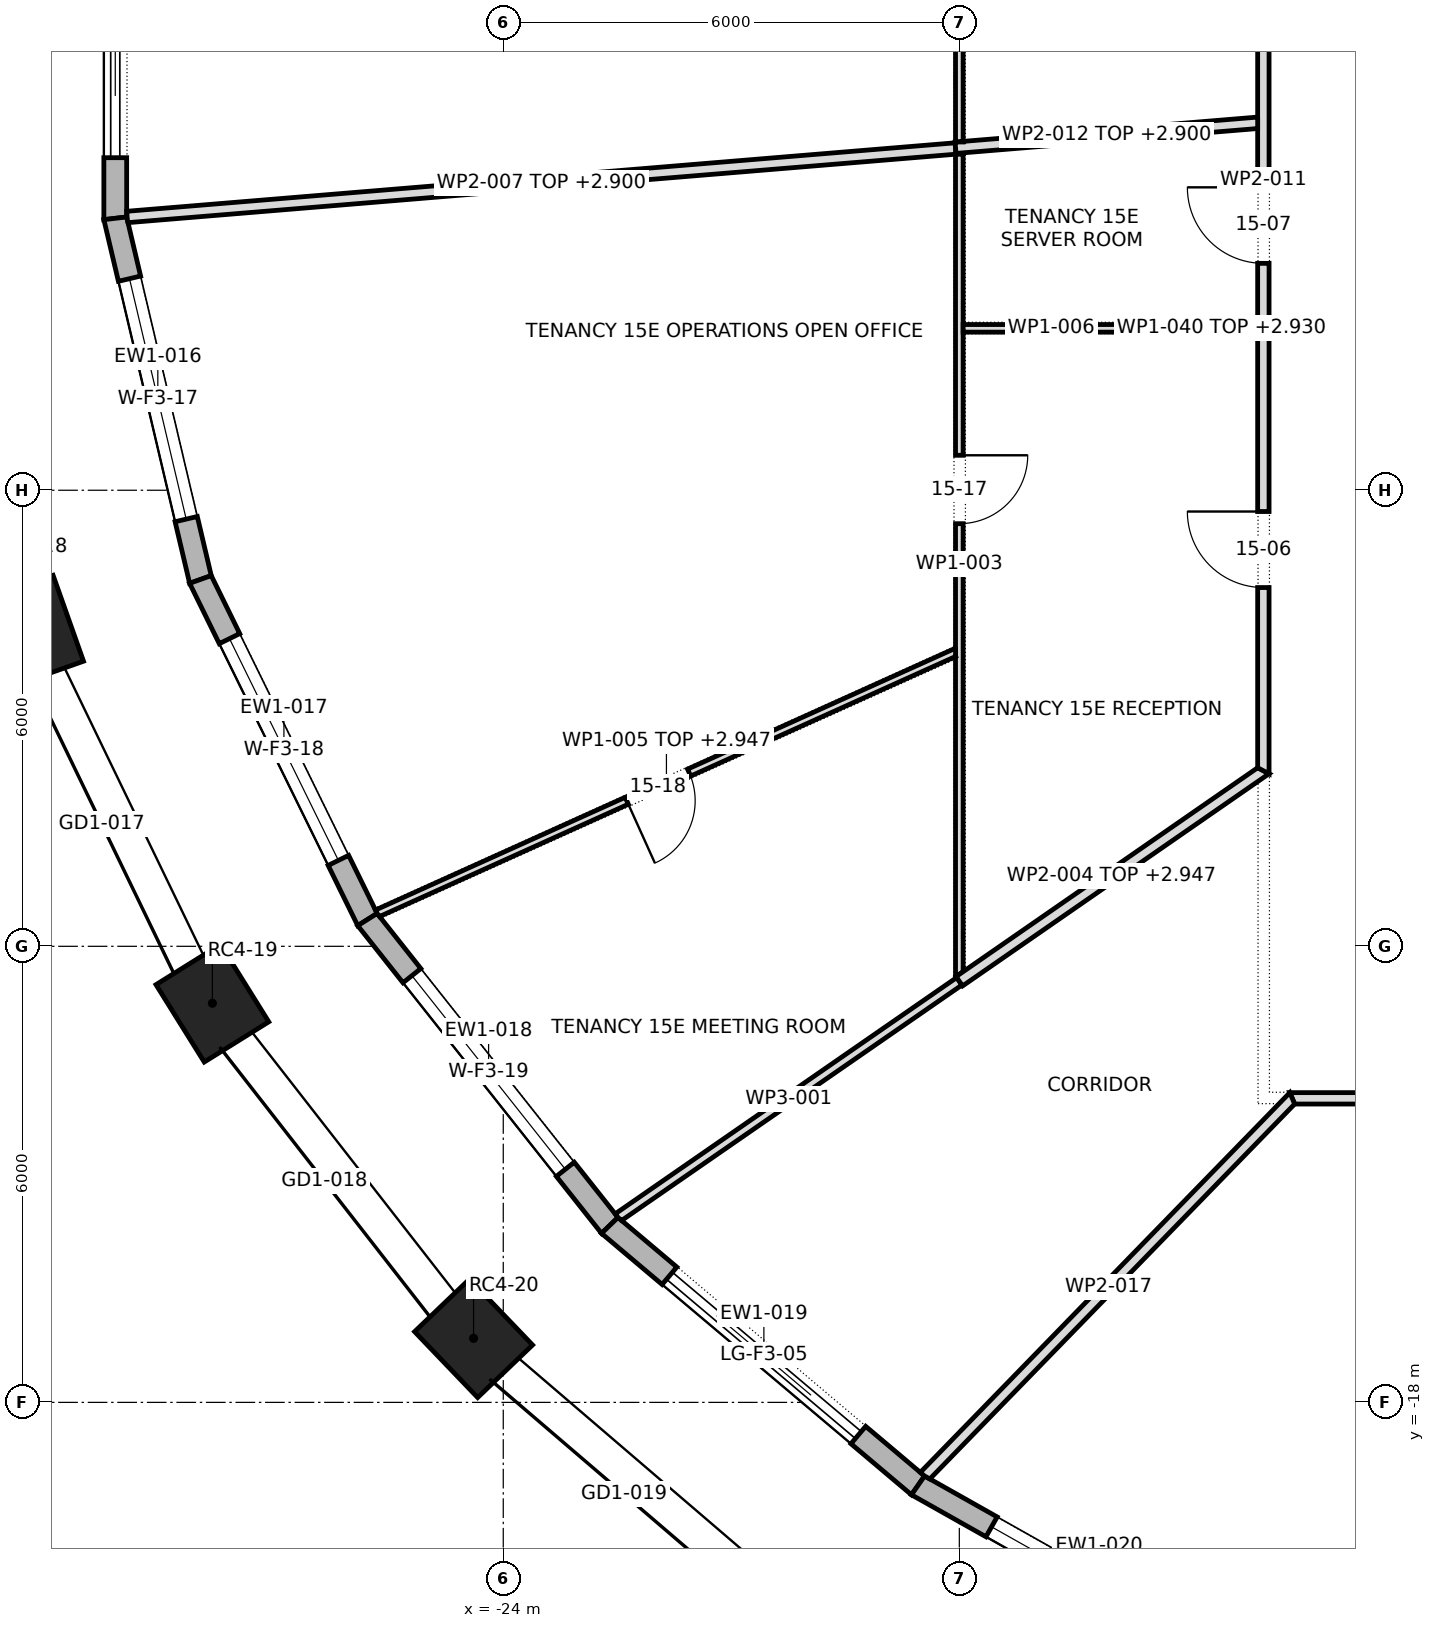
"""IFC4 building model, lengths in metres.
Left out: names, types, materials, properties, quantities, classifications, styles, units other than length and angle.
Written with IfcOpenShell. Run it as: python <this file> out.ifc"""

import sys

from ifc_helpers import new_model, si_unit, direction, frame, frame_2d, origin, origin_2d, place, context, subcontext, project, spatial, polyline, rectangle, outline, extrude, element, fill, save


model = new_model("IFC4")
c1 = context("Model", 3, precision=1e-05, world=origin(), true_north=direction((0.0, 1.0)))
c2 = subcontext(c1, "Body", "Model", "MODEL_VIEW")
j1 = project(units=[si_unit("LENGTHUNIT", "METRE"), si_unit("PLANEANGLEUNIT", "RADIAN")], contexts=[c1])
p1 = place(None, origin())
s1 = spatial("IfcSite", under=j1, at=p1, CompositionType="ELEMENT")
p2 = place(p1, origin())
s2 = spatial("IfcBuilding", under=s1, at=p2, CompositionType="ELEMENT")
p3 = place(p2, frame((0.0, 0.0, 222.9)))
s3 = spatial("IfcBuildingStorey", under=s2, at=p3, CompositionType="ELEMENT", Elevation=222.9)
for number, where, z_axis, x_axis in (
    (1, (-30.194, -7.851, 0.0), (0.0, 0.0, 1.0), (0.334, -0.943, 0.0)),
    (2, (-27.827, -12.749, 0.0), (0.0, 0.0, 1.0), (0.529, -0.849, 0.0)),
    (3, (-24.39, -17.157, 0.0), (0.0, 0.0, 1.0), (0.692, -0.722, 0.0)),
):
    element("IfcColumn", number, at=place(p3, frame(where, z_axis=z_axis, x_axis=x_axis)), inside=s3, PredefinedType="COLUMN", context=c2, shape_type="SweptSolid", body=[
        extrude(rectangle(XDim=1.2, YDim=1.0, at=origin_2d()), origin(), (0.0, 0.0, 1.0), 4.0),
    ])
p4 = place(p3, frame((-29.104, 2.423, 0.0), z_axis=(0.0, 0.0, 1.0), x_axis=(0.0, -1.0, 0.0)))
e4 = element("IfcWall", 4, at=p4, inside=s3, PredefinedType="STANDARD", context=c2, shape_type="SweptSolid", body=[
    extrude(outline(polyline([(-0.017, -0.15), (4.863, -0.15), (4.828, 0.15), (0.017, 0.15), (-0.017, -0.15)])), origin(), (0.0, 0.0, 1.0), 3.7),
])
p5 = place(p4, frame((0.798, 0.0, 0.0)))
e5 = element("IfcOpeningElement", 5, at=p5, cuts=e4, PredefinedType="OPENING", context=c2, shape_type="SweptSolid", body=[
    extrude(rectangle(XDim=3.25, YDim=3.25, at=frame_2d((1.625, 1.625))), frame((0.0, 0.162, 0.0), z_axis=(0.0, -1.0, 0.0), x_axis=(1.0, 0.0, 0.0)), (0.0, 0.0, 1.0), 0.324),
])
p6 = place(p3, frame((-29.104, -2.423, 0.0), z_axis=(0.0, 0.0, 1.0), x_axis=(0.229546618766, -0.97329766763, 0.0)))
e6 = element("IfcWall", 6, at=p6, inside=s3, PredefinedType="STANDARD", context=c2, shape_type="SweptSolid", body=[
    extrude(outline(polyline([(-0.017, -0.15), (4.899, -0.15), (4.865, 0.15), (0.017, 0.15), (-0.017, -0.15)])), origin(), (0.0, 0.0, 1.0), 3.7),
])
p7 = place(p6, frame((0.816, 0.0, 0.6)))
e7 = element("IfcOpeningElement", 7, at=p7, cuts=e6, PredefinedType="OPENING", context=c2, shape_type="SweptSolid", body=[
    extrude(rectangle(XDim=3.25, YDim=2.65, at=frame_2d((1.625, 1.325))), frame((0.0, 0.162, 0.0), z_axis=(0.0, -1.0, 0.0), x_axis=(1.0, 0.0, 0.0)), (0.0, 0.0, 1.0), 0.324),
])
p8 = place(p3, frame((-27.984, -7.174, 0.0), z_axis=(0.0, 0.0, 1.0), x_axis=(0.440795186599, -0.897607711348, 0.0)))
e8 = element("IfcWall", 8, at=p8, inside=s3, PredefinedType="STANDARD", context=c2, shape_type="SweptSolid", body=[
    extrude(outline(polyline([(-0.017, -0.15), (5.0, -0.15), (4.968, 0.15), (0.017, 0.15), (-0.017, -0.15)])), origin(), (0.0, 0.0, 1.0), 3.7),
])
p9 = place(p8, frame((0.867, 0.0, 0.6)))
e9 = element("IfcOpeningElement", 9, at=p9, cuts=e8, PredefinedType="OPENING", context=c2, shape_type="SweptSolid", body=[
    extrude(rectangle(XDim=3.25, YDim=2.65, at=frame_2d((1.625, 1.325))), frame((0.0, 0.162, 0.0), z_axis=(0.0, -1.0, 0.0), x_axis=(1.0, 0.0, 0.0)), (0.0, 0.0, 1.0), 0.324),
])
p10 = place(p3, frame((-25.787, -11.648, 0.0), z_axis=(0.0, 0.0, 1.0), x_axis=(0.621017151557, -0.783796974651, 0.0)))
e10 = element("IfcWall", 10, at=p10, inside=s3, PredefinedType="STANDARD", context=c2, shape_type="SweptSolid", body=[
    extrude(outline(polyline([(-0.016, -0.15), (5.149, -0.15), (5.119, 0.15), (0.016, 0.15), (-0.016, -0.15)])), origin(), (0.0, 0.0, 1.0), 3.7),
])
p11 = place(p10, frame((0.942, 0.0, 0.6)))
e11 = element("IfcOpeningElement", 11, at=p11, cuts=e10, PredefinedType="OPENING", context=c2, shape_type="SweptSolid", body=[
    extrude(rectangle(XDim=3.25, YDim=2.65, at=frame_2d((1.625, 1.325))), frame((0.0, 0.162, 0.0), z_axis=(0.0, -1.0, 0.0), x_axis=(1.0, 0.0, 0.0)), (0.0, 0.0, 1.0), 0.324),
])
p12 = place(p3, frame((-22.599, -15.672, 0.0), z_axis=(0.0, 0.0, 1.0), x_axis=(0.764397795062, -0.644744919255, 0.0)))
e12 = element("IfcWall", 12, at=p12, inside=s3, PredefinedType="STANDARD", context=c2, shape_type="SweptSolid", body=[
    extrude(outline(polyline([(-0.015, -0.15), (5.319, -0.15), (5.291, 0.15), (0.015, 0.15), (-0.015, -0.15)])), origin(), (0.0, 0.0, 1.0), 3.7),
])
p13 = place(p12, frame((1.028, 0.0, 0.0)))
e13 = element("IfcOpeningElement", 13, at=p13, cuts=e12, PredefinedType="OPENING", context=c2, shape_type="SweptSolid", body=[
    extrude(rectangle(XDim=3.25, YDim=3.25, at=frame_2d((1.625, 1.625))), frame((0.0, 0.162, 0.0), z_axis=(0.0, -1.0, 0.0), x_axis=(1.0, 0.0, 0.0)), (0.0, 0.0, 1.0), 0.324),
])
p14 = place(p3, frame((-18.543, -19.092, 0.0), z_axis=(0.0, 0.0, 1.0), x_axis=(0.871207038577, -0.490915772749, 0.0)))
e14 = element("IfcWall", 14, at=p14, inside=s3, PredefinedType="STANDARD", context=c2, shape_type="SweptSolid", body=[
    extrude(outline(polyline([(-0.014, -0.15), (5.484, -0.15), (5.458, 0.15), (0.014, 0.15), (-0.014, -0.15)])), origin(), (0.0, 0.0, 1.0), 3.7),
])
p15 = place(p14, frame((1.111, 0.0, 0.6)))
e15 = element("IfcOpeningElement", 15, at=p15, cuts=e14, PredefinedType="OPENING", context=c2, shape_type="SweptSolid", body=[
    extrude(rectangle(XDim=3.25, YDim=2.65, at=frame_2d((1.625, 1.325))), frame((0.0, 0.162, 0.0), z_axis=(0.0, -1.0, 0.0), x_axis=(1.0, 0.0, 0.0)), (0.0, 0.0, 1.0), 0.324),
])
p16 = place(p3, frame((-22.493, -15.569, 0.0), z_axis=(0.0, 0.0, 1.0), x_axis=(0.822322462014, 0.569021764494, 0.0)))
e16 = element("IfcWall", 16, at=p16, inside=s3, PredefinedType="PARTITIONING", context=c2, shape_type="SweptSolid", body=[
    extrude(outline(polyline([(0.02, -0.06), (1.834, -0.06), (3.649, -0.06), (5.464, -0.06), (5.464, 0.06), (3.643, 0.06), (1.821, 0.06), (0.0, 0.06), (0.0, 0.053), (0.003, 0.0), (0.02, -0.06)])), origin(), (0.0, 0.0, 1.0), 3.7),
])
p17 = place(p3, frame((-18.0, -12.421, 0.0), z_axis=(0.0, 0.0, 1.0), x_axis=(0.0, 1.0, 0.0)))
e17 = element("IfcWall", 17, at=p17, inside=s3, PredefinedType="PARTITIONING", context=c2, shape_type="SweptSolid", body=[
    extrude(outline(polyline([(0.087, -0.05), (1.77, -0.05), (3.453, -0.05), (5.136, -0.05), (6.819, -0.05), (8.501, -0.05), (8.501, -0.05), (8.601, -0.05), (8.601, -0.05), (10.842, -0.05), (10.842, 0.046), (10.842, 0.05), (9.191, 0.05), (7.541, 0.05), (5.89, 0.05), (4.24, 0.05), (4.235, 0.048), (4.234, 0.05), (2.823, 0.05), (1.411, 0.05), (0.0, 0.05), (0.0, 0.05), (0.011, 0.034), (0.023, 0.043), (0.087, -0.05)])), origin(), (0.0, 0.0, 1.0), 3.7),
])
p18 = place(p17, frame((5.981, 0.0, 0.0)))
e18 = element("IfcOpeningElement", 18, at=p18, cuts=e17, PredefinedType="OPENING", context=c2, shape_type="SweptSolid", body=[
    extrude(rectangle(XDim=0.9, YDim=2.1, at=frame_2d((0.45, 1.05))), frame((0.0, 0.062, 0.0), z_axis=(0.0, -1.0, 0.0), x_axis=(1.0, 0.0, 0.0)), (0.0, 0.0, 1.0), 0.124),
])
p19 = place(p3, frame((-18.0, -12.46, 0.0), z_axis=(0.0, 0.0, 1.0), x_axis=(0.822102584422, 0.56933938972, 0.0)))
e19 = element("IfcWall", 19, at=p19, inside=s3, PredefinedType="PARTITIONING", context=c2, shape_type="SweptSolid", body=[
    extrude(outline(polyline([(0.0, -0.075), (1.635, -0.075), (3.27, -0.075), (4.905, -0.075), (4.826, 0.075), (3.217, 0.075), (1.609, 0.075), (0.0, 0.075), (0.0, -0.075)])), origin(), (0.0, 0.0, 1.0), 2.947),
])
p20 = place(p3, frame((-18.03, -8.123, 0.0), z_axis=(0.0, 0.0, 1.0), x_axis=(-0.911431984772, -0.411450771216, 0.0)))
e20 = element("IfcWall", 20, at=p20, inside=s3, PredefinedType="PARTITIONING", context=c2, shape_type="SweptSolid", body=[
    extrude(outline(polyline([(8.372, -0.05), (8.372, -0.042), (8.371, -0.0), (8.358, 0.05), (6.696, 0.05), (5.033, 0.05), (3.37, 0.05), (1.708, 0.05), (0.045, 0.05), (0.0, -0.05), (0.0, -0.05), (1.675, -0.05), (3.349, -0.05), (5.023, -0.05), (6.698, -0.05), (8.372, -0.05)])), origin(), (0.0, 0.0, 1.0), 2.947),
])
p21 = place(p20, frame((3.868, 0.0, 0.0)))
e21 = element("IfcOpeningElement", 21, at=p21, cuts=e20, PredefinedType="OPENING", context=c2, shape_type="SweptSolid", body=[
    extrude(rectangle(XDim=0.9, YDim=2.1, at=frame_2d((0.45, 1.05))), frame((0.0, 0.062, 0.0), z_axis=(0.0, -1.0, 0.0), x_axis=(1.0, 0.0, 0.0)), (0.0, 0.0, 1.0), 0.124),
])
p22 = place(p3, frame((-17.95, -3.87, 0.0), z_axis=(0.0, 0.0, 1.0), x_axis=(1.0, 0.0, 0.0)))
e22 = element("IfcWall", 22, at=p22, inside=s3, PredefinedType="PARTITIONING", context=c2, shape_type="SweptSolid", body=[
    extrude(rectangle(XDim=2.321, YDim=0.1, at=frame_2d((1.161, 0.0))), origin(), (0.0, 0.0, 1.0), 3.7),
])
p23 = place(p3, frame((-18.049, -1.504, 0.0), z_axis=(0.0, 0.0, 1.0), x_axis=(-0.996601116086, -0.082378488796, 0.0)))
e23 = element("IfcWall", 23, at=p23, inside=s3, PredefinedType="PARTITIONING", context=c2, shape_type="SweptSolid", body=[
    extrude(outline(polyline([(10.936, -0.075), (10.936, 0.044), (10.931, 0.075), (9.11, 0.075), (7.29, 0.075), (5.469, 0.075), (3.648, 0.075), (1.828, 0.075), (0.007, 0.075), (0.007, 0.074), (0.002, 0.075), (0.0, 0.075), (0.0, -0.075), (1.823, -0.075), (3.645, -0.075), (5.468, -0.075), (7.291, -0.075), (9.113, -0.075), (10.936, -0.075)])), origin(), (0.0, 0.0, 1.0), 2.9),
])
p24 = place(p3, frame((-18.0, -1.418, 0.0), z_axis=(0.0, 0.0, 1.0), x_axis=(0.0, 1.0, 0.0)))
e24 = element("IfcWall", 24, at=p24, inside=s3, PredefinedType="PARTITIONING", context=c2, shape_type="SweptSolid", body=[
    extrude(outline(polyline([(0.008, -0.05), (1.813, -0.05), (3.618, -0.05), (5.423, -0.05), (7.229, -0.05), (7.229, -0.05), (7.328, -0.05), (7.328, -0.05), (8.934, -0.05), (10.54, -0.05), (12.146, -0.05), (13.751, -0.05), (13.821, 0.05), (13.821, 0.05), (11.889, 0.05), (9.957, 0.05), (8.025, 0.05), (6.093, 0.05), (6.092, 0.048), (6.085, 0.05), (4.564, 0.05), (3.042, 0.05), (1.521, 0.05), (0.0, 0.05), (0.0, 0.045), (0.008, -0.05)])), origin(), (0.0, 0.0, 1.0), 3.7),
])
p25 = place(p24, frame((10.128, 0.0, 0.0)))
e25 = element("IfcOpeningElement", 25, at=p25, cuts=e24, PredefinedType="OPENING", context=c2, shape_type="SweptSolid", body=[
    extrude(rectangle(XDim=0.9, YDim=2.1, at=frame_2d((0.45, 1.05))), frame((0.0, 0.062, 0.0), z_axis=(0.0, -1.0, 0.0), x_axis=(1.0, 0.0, 0.0)), (0.0, 0.0, 1.0), 0.124),
])
p26 = place(p3, frame((-13.652, -14.0, 0.0), z_axis=(0.0, 0.0, 1.0), x_axis=(1.0, 0.0, 0.0)))
e26 = element("IfcWall", 26, at=p26, inside=s3, PredefinedType="PARTITIONING", context=c2, shape_type="SweptSolid", body=[
    extrude(outline(polyline([(0.063, -0.075), (2.004, -0.075), (3.946, -0.075), (5.887, -0.075), (7.828, -0.075), (9.769, -0.075), (11.71, -0.075), (13.652, -0.075), (15.593, -0.075), (17.534, -0.075), (19.475, -0.075), (21.417, -0.075), (23.358, -0.075), (25.299, -0.075), (27.24, -0.075), (27.303, 0.075), (27.303, 0.075), (25.353, 0.075), (23.403, 0.075), (21.453, 0.075), (19.502, 0.075), (17.552, 0.075), (15.602, 0.075), (13.652, 0.075), (11.701, 0.075), (9.751, 0.075), (7.801, 0.075), (5.851, 0.075), (3.9, 0.075), (1.95, 0.075), (0.0, 0.075), (0.0, 0.075), (0.063, -0.075)])), origin(), (0.0, 0.0, 1.0), 3.7),
])
p27 = place(p26, frame((5.527, 0.0, 0.0)))
e27 = element("IfcOpeningElement", 27, at=p27, cuts=e26, PredefinedType="OPENING", context=c2, shape_type="SweptSolid", body=[
    extrude(rectangle(XDim=1.0, YDim=2.1, at=frame_2d((0.5, 1.05))), frame((0.0, 0.087, 0.0), z_axis=(0.0, -1.0, 0.0), x_axis=(1.0, 0.0, 0.0)), (0.0, 0.0, 1.0), 0.174),
])
p28 = place(p26, frame((14.857, 0.0, 0.0)))
e28 = element("IfcOpeningElement", 28, at=p28, cuts=e26, PredefinedType="OPENING", context=c2, shape_type="SweptSolid", body=[
    extrude(rectangle(XDim=1.0, YDim=2.1, at=frame_2d((0.5, 1.05))), frame((0.0, 0.087, 0.0), z_axis=(0.0, -1.0, 0.0), x_axis=(1.0, 0.0, 0.0)), (0.0, 0.0, 1.0), 0.174),
])
p29 = place(p26, frame((22.482, 0.0, 0.0)))
e29 = element("IfcOpeningElement", 29, at=p29, cuts=e26, PredefinedType="OPENING", context=c2, shape_type="SweptSolid", body=[
    extrude(rectangle(XDim=1.0, YDim=2.1, at=frame_2d((0.5, 1.05))), frame((0.0, 0.087, 0.0), z_axis=(0.0, -1.0, 0.0), x_axis=(1.0, 0.0, 0.0)), (0.0, 0.0, 1.0), 0.174),
])
p30 = place(p3, frame((-14.0, -9.729, 0.0), z_axis=(0.0, 0.0, 1.0), x_axis=(0.0, 1.0, 0.0)))
e30 = element("IfcWall", 30, at=p30, inside=s3, PredefinedType="PARTITIONING", context=c2, shape_type="SweptSolid", body=[
    extrude(outline(polyline([(15.589, 0.075), (13.65, 0.075), (11.712, 0.075), (9.773, 0.075), (7.834, 0.075), (5.895, 0.075), (3.956, 0.075), (2.017, 0.075), (0.079, 0.075), (0.0, -0.075), (0.0, -0.075), (1.949, -0.075), (3.897, -0.075), (5.846, -0.075), (7.795, -0.075), (9.743, -0.075), (11.692, -0.075), (13.641, -0.075), (15.589, -0.075), (15.589, 0.075)])), origin(), (0.0, 0.0, 1.0), 3.7),
])
p31 = place(p30, frame((11.579, 0.0, 0.0)))
e31 = element("IfcOpeningElement", 31, at=p31, cuts=e30, PredefinedType="OPENING", context=c2, shape_type="SweptSolid", body=[
    extrude(rectangle(XDim=1.0, YDim=2.1, at=frame_2d((0.5, 1.05))), frame((0.0, 0.087, 0.0), z_axis=(0.0, -1.0, 0.0), x_axis=(1.0, 0.0, 0.0)), (0.0, 0.0, 1.0), 0.174),
])
p32 = place(p30, frame((2.449, 0.0, 0.0)))
e32 = element("IfcOpeningElement", 32, at=p32, cuts=e30, PredefinedType="OPENING", context=c2, shape_type="SweptSolid", body=[
    extrude(rectangle(XDim=1.0, YDim=2.1, at=frame_2d((0.5, 1.05))), frame((0.0, 0.087, 0.0), z_axis=(0.0, -1.0, 0.0), x_axis=(1.0, 0.0, 0.0)), (0.0, 0.0, 1.0), 0.174),
])
p33 = place(p30, frame((6.714, 0.0, 0.0)))
e33 = element("IfcOpeningElement", 33, at=p33, cuts=e30, PredefinedType="OPENING", context=c2, shape_type="SweptSolid", body=[
    extrude(rectangle(XDim=1.0, YDim=2.1, at=frame_2d((0.5, 1.05))), frame((0.0, 0.087, 0.0), z_axis=(0.0, -1.0, 0.0), x_axis=(1.0, 0.0, 0.0)), (0.0, 0.0, 1.0), 0.174),
])
p34 = place(p3, frame((-14.069, -1.166, 0.0), z_axis=(0.0, 0.0, 1.0), x_axis=(-0.996614549641, -0.082215810186, 0.0)))
e34 = element("IfcWall", 34, at=p34, inside=s3, PredefinedType="PARTITIONING", context=c2, shape_type="SweptSolid", body=[
    extrude(outline(polyline([(0.0, -0.075), (1.944, -0.075), (3.888, -0.075), (3.888, -0.067), (3.982, -0.075), (3.994, -0.075), (3.994, 0.075), (2.003, 0.075), (0.012, 0.075), (0.0, -0.069), (0.0, -0.075)])), origin(), (0.0, 0.0, 1.0), 2.9),
])
p35 = place(p3, frame((-13.598, -13.977, 0.0), z_axis=(0.0, 0.0, 1.0), x_axis=(-0.697374409368, -0.716707006494, 0.0)))
e35 = element("IfcWall", 35, at=p35, inside=s3, PredefinedType="PARTITIONING", context=c2, shape_type="SweptSolid", body=[
    extrude(outline(polyline([(6.971, -0.075), (6.971, -0.07), (6.966, -0.002), (6.946, 0.075), (5.225, 0.075), (3.505, 0.075), (1.784, 0.075), (0.063, 0.075), (0.032, 0.0), (0.0, -0.075), (1.743, -0.075), (3.486, -0.075), (5.228, -0.075), (6.971, -0.075)])), origin(), (0.0, 0.0, 1.0), 3.7),
])
p36 = place(p3, frame((-15.629, -3.87, 0.0), z_axis=(0.0, 0.0, 1.0), x_axis=(1.0, 0.0, 0.0)))
e36 = element("IfcWall", 36, at=p36, inside=s3, PredefinedType="PARTITIONING", context=c2, shape_type="SweptSolid", body=[
    extrude(rectangle(XDim=1.554, YDim=0.1, at=frame_2d((0.777, 0.0))), origin(), (0.0, 0.0, 1.0), 2.93),
])
p37 = place(p5, origin())
e37 = element("IfcDoor", 37, at=p37, inside=s3, OperationType="DOUBLE_DOOR_SLIDING", PredefinedType="DOOR", context=c2, shape_type="SweptSolid", body=[
    extrude(rectangle(XDim=3.25, YDim=3.25, at=frame_2d((1.625, 1.625))), frame((0.0, 0.025, 0.0), z_axis=(0.0, -1.0, 0.0), x_axis=(1.0, 0.0, 0.0)), (0.0, 0.0, 1.0), 0.05),
])
fill(e5, e37)
p38 = place(p7, origin())
e38 = element("IfcWindow", 38, at=p38, inside=s3, PartitioningType="TRIPLE_PANEL_VERTICAL", PredefinedType="WINDOW", context=c2, shape_type="SweptSolid", body=[
    extrude(rectangle(XDim=3.25, YDim=2.65, at=frame_2d((1.625, 1.325))), frame((0.0, 0.03, 0.0), z_axis=(0.0, -1.0, 0.0), x_axis=(1.0, 0.0, 0.0)), (0.0, 0.0, 1.0), 0.06),
])
fill(e7, e38)
p39 = place(p9, origin())
e39 = element("IfcWindow", 39, at=p39, inside=s3, PartitioningType="TRIPLE_PANEL_VERTICAL", PredefinedType="WINDOW", context=c2, shape_type="SweptSolid", body=[
    extrude(rectangle(XDim=3.25, YDim=2.65, at=frame_2d((1.625, 1.325))), frame((0.0, 0.03, 0.0), z_axis=(0.0, -1.0, 0.0), x_axis=(1.0, 0.0, 0.0)), (0.0, 0.0, 1.0), 0.06),
])
fill(e9, e39)
p40 = place(p11, origin())
e40 = element("IfcWindow", 40, at=p40, inside=s3, PartitioningType="TRIPLE_PANEL_VERTICAL", PredefinedType="WINDOW", context=c2, shape_type="SweptSolid", body=[
    extrude(rectangle(XDim=3.25, YDim=2.65, at=frame_2d((1.625, 1.325))), frame((0.0, 0.03, 0.0), z_axis=(0.0, -1.0, 0.0), x_axis=(1.0, 0.0, 0.0)), (0.0, 0.0, 1.0), 0.06),
])
fill(e11, e40)
p41 = place(p13, origin())
e41 = element("IfcDoor", 41, at=p41, inside=s3, OperationType="DOUBLE_DOOR_SLIDING", PredefinedType="DOOR", context=c2, shape_type="SweptSolid", body=[
    extrude(rectangle(XDim=3.25, YDim=3.25, at=frame_2d((1.625, 1.625))), frame((0.0, 0.025, 0.0), z_axis=(0.0, -1.0, 0.0), x_axis=(1.0, 0.0, 0.0)), (0.0, 0.0, 1.0), 0.05),
])
fill(e13, e41)
p42 = place(p15, origin())
e42 = element("IfcWindow", 42, at=p42, inside=s3, PartitioningType="TRIPLE_PANEL_VERTICAL", PredefinedType="WINDOW", context=c2, shape_type="SweptSolid", body=[
    extrude(rectangle(XDim=3.25, YDim=2.65, at=frame_2d((1.625, 1.325))), frame((0.0, 0.03, 0.0), z_axis=(0.0, -1.0, 0.0), x_axis=(1.0, 0.0, 0.0)), (0.0, 0.0, 1.0), 0.06),
])
fill(e15, e42)
p43 = place(p32, origin())
e43 = element("IfcDoor", 43, at=p43, inside=s3, OperationType="SINGLE_SWING_LEFT", PredefinedType="DOOR", context=c2, shape_type="SweptSolid", body=[
    extrude(rectangle(XDim=1.0, YDim=2.1, at=frame_2d((0.5, 1.05))), frame((0.0, 0.025, 0.0), z_axis=(0.0, -1.0, 0.0), x_axis=(1.0, 0.0, 0.0)), (0.0, 0.0, 1.0), 0.05),
])
fill(e32, e43)
p44 = place(p33, origin())
e44 = element("IfcDoor", 44, at=p44, inside=s3, OperationType="SINGLE_SWING_LEFT", PredefinedType="DOOR", context=c2, shape_type="SweptSolid", body=[
    extrude(rectangle(XDim=1.0, YDim=2.1, at=frame_2d((0.5, 1.05))), frame((0.0, 0.025, 0.0), z_axis=(0.0, -1.0, 0.0), x_axis=(1.0, 0.0, 0.0)), (0.0, 0.0, 1.0), 0.05),
])
fill(e33, e44)
p45 = place(p18, frame((0.9, 0.0, 0.0), z_axis=(0.0, 0.0, 1.0), x_axis=(-1.0, 0.0, 0.0)))
e45 = element("IfcDoor", 45, at=p45, inside=s3, OperationType="SINGLE_SWING_RIGHT", PredefinedType="DOOR", context=c2, shape_type="SweptSolid", body=[
    extrude(rectangle(XDim=0.9, YDim=2.1, at=frame_2d((0.45, 1.05))), frame((0.0, 0.025, 0.0), z_axis=(0.0, -1.0, 0.0), x_axis=(1.0, 0.0, 0.0)), (0.0, 0.0, 1.0), 0.05),
])
fill(e18, e45)
p46 = place(p21, origin())
e46 = element("IfcDoor", 46, at=p46, inside=s3, OperationType="SINGLE_SWING_LEFT", PredefinedType="DOOR", context=c2, shape_type="SweptSolid", body=[
    extrude(rectangle(XDim=0.9, YDim=2.1, at=frame_2d((0.45, 1.05))), frame((0.0, 0.025, 0.0), z_axis=(0.0, -1.0, 0.0), x_axis=(1.0, 0.0, 0.0)), (0.0, 0.0, 1.0), 0.05),
])
fill(e21, e46)
save(model, sys.argv[1])
